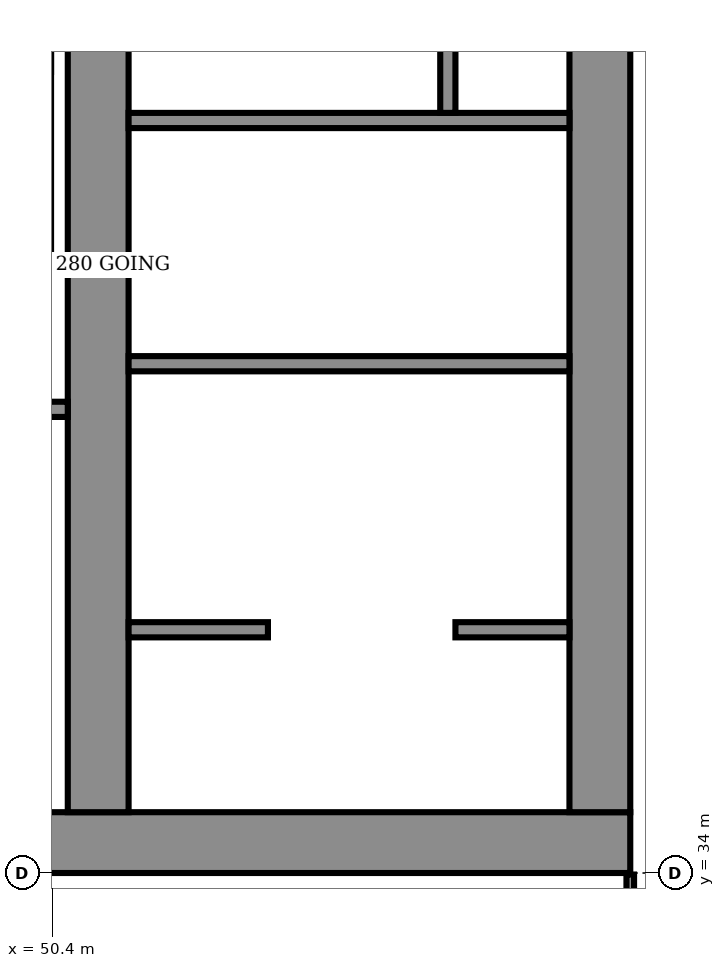
"""IFC4 building model, lengths in metres.
Left out: names, types, materials, properties, quantities, classifications, styles, units other than length and angle.
Written with IfcOpenShell. Run it as: python <this file> out.ifc"""

import sys

from ifc_helpers import new_model, si_unit, direction, frame, frame_2d, origin, place, context, subcontext, project, spatial, polyline, rectangle, outline, extrude, element, fill, save


model = new_model("IFC4")
c1 = context("Model", 3, precision=1e-05, world=origin(), true_north=direction((0.0, 1.0)))
c2 = subcontext(c1, "Body", "Model", "MODEL_VIEW")
j1 = project(units=[si_unit("LENGTHUNIT", "METRE"), si_unit("PLANEANGLEUNIT", "RADIAN")], contexts=[c1])
p1 = place(None, origin())
s1 = spatial("IfcSite", under=j1, at=p1, CompositionType="ELEMENT")
p2 = place(p1, origin())
s2 = spatial("IfcBuilding", under=s1, at=p2, CompositionType="ELEMENT")
p3 = place(p2, frame((0.0, 0.0, 151.9)))
s3 = spatial("IfcBuildingStorey", under=s2, at=p3, CompositionType="ELEMENT", Elevation=151.9)
p4 = place(p3, frame((16.0, 34.4, 0.0), z_axis=(0.0, 0.0, 1.0), x_axis=(1.0, 0.0, 0.0)))
e1 = element("IfcWall", 1, at=p4, inside=s3, PredefinedType="SHEAR", context=c2, shape_type="SweptSolid", body=[
    extrude(rectangle(XDim=42.0, YDim=0.8, at=frame_2d((21.0, 0.0))), origin(), (0.0, 0.0, 1.0), 3.6),
])
p5 = place(p4, frame((3.2, 0.0, 0.0)))
e2 = element("IfcOpeningElement", 2, at=p5, cuts=e1, PredefinedType="OPENING", context=c2, shape_type="SweptSolid", body=[
    extrude(rectangle(XDim=1.0, YDim=2.1, at=frame_2d((0.5, 1.05))), frame((0.0, 0.41, 0.0), z_axis=(0.0, -1.0, 0.0), x_axis=(1.0, 0.0, 0.0)), (0.0, 0.0, 1.0), 0.82),
])
p6 = place(p4, frame((7.65, 0.0, 0.0)))
e3 = element("IfcOpeningElement", 3, at=p6, cuts=e1, PredefinedType="OPENING", context=c2, shape_type="SweptSolid", body=[
    extrude(rectangle(XDim=1.2, YDim=2.1, at=frame_2d((0.6, 1.05))), frame((0.0, 0.41, 0.0), z_axis=(0.0, -1.0, 0.0), x_axis=(1.0, 0.0, 0.0)), (0.0, 0.0, 1.0), 0.82),
])
p7 = place(p4, frame((14.767, 0.0, 0.0)))
e4 = element("IfcOpeningElement", 4, at=p7, cuts=e1, PredefinedType="OPENING", context=c2, shape_type="SweptSolid", body=[
    extrude(rectangle(XDim=1.1, YDim=2.1, at=frame_2d((0.55, 1.05))), frame((0.0, 0.41, 0.0), z_axis=(0.0, -1.0, 0.0), x_axis=(1.0, 0.0, 0.0)), (0.0, 0.0, 1.0), 0.82),
])
p8 = place(p4, frame((19.133, 0.0, 0.0)))
e5 = element("IfcOpeningElement", 5, at=p8, cuts=e1, PredefinedType="OPENING", context=c2, shape_type="SweptSolid", body=[
    extrude(rectangle(XDim=1.1, YDim=2.1, at=frame_2d((0.55, 1.05))), frame((0.0, 0.41, 0.0), z_axis=(0.0, -1.0, 0.0), x_axis=(1.0, 0.0, 0.0)), (0.0, 0.0, 1.0), 0.82),
])
p9 = place(p4, frame((16.8, 0.0, 0.0)))
e6 = element("IfcOpeningElement", 6, at=p9, cuts=e1, PredefinedType="OPENING", context=c2, shape_type="SweptSolid", body=[
    extrude(rectangle(XDim=1.4, YDim=2.1, at=frame_2d((0.7, 1.05))), frame((0.0, 0.41, 0.0), z_axis=(0.0, -1.0, 0.0), x_axis=(1.0, 0.0, 0.0)), (0.0, 0.0, 1.0), 0.82),
])
p10 = place(p4, frame((21.767, 0.0, 0.0)))
e7 = element("IfcOpeningElement", 7, at=p10, cuts=e1, PredefinedType="OPENING", context=c2, shape_type="SweptSolid", body=[
    extrude(rectangle(XDim=1.1, YDim=2.1, at=frame_2d((0.55, 1.05))), frame((0.0, 0.41, 0.0), z_axis=(0.0, -1.0, 0.0), x_axis=(1.0, 0.0, 0.0)), (0.0, 0.0, 1.0), 0.82),
])
p11 = place(p4, frame((23.95, 0.0, 0.0)))
e8 = element("IfcOpeningElement", 8, at=p11, cuts=e1, PredefinedType="OPENING", context=c2, shape_type="SweptSolid", body=[
    extrude(rectangle(XDim=1.1, YDim=2.1, at=frame_2d((0.55, 1.05))), frame((0.0, 0.41, 0.0), z_axis=(0.0, -1.0, 0.0), x_axis=(1.0, 0.0, 0.0)), (0.0, 0.0, 1.0), 0.82),
])
p12 = place(p4, frame((26.133, 0.0, 0.0)))
e9 = element("IfcOpeningElement", 9, at=p12, cuts=e1, PredefinedType="OPENING", context=c2, shape_type="SweptSolid", body=[
    extrude(rectangle(XDim=1.1, YDim=2.1, at=frame_2d((0.55, 1.05))), frame((0.0, 0.41, 0.0), z_axis=(0.0, -1.0, 0.0), x_axis=(1.0, 0.0, 0.0)), (0.0, 0.0, 1.0), 0.82),
])
p13 = place(p4, frame((33.15, 0.0, 0.0)))
e10 = element("IfcOpeningElement", 10, at=p13, cuts=e1, PredefinedType="OPENING", context=c2, shape_type="SweptSolid", body=[
    extrude(rectangle(XDim=1.2, YDim=2.1, at=frame_2d((0.6, 1.05))), frame((0.0, 0.41, 0.0), z_axis=(0.0, -1.0, 0.0), x_axis=(1.0, 0.0, 0.0)), (0.0, 0.0, 1.0), 0.82),
])
p14 = place(p4, frame((35.817, 0.0, 0.0)))
e11 = element("IfcOpeningElement", 11, at=p14, cuts=e1, PredefinedType="OPENING", context=c2, shape_type="SweptSolid", body=[
    extrude(rectangle(XDim=1.0, YDim=2.1, at=frame_2d((0.5, 1.05))), frame((0.0, 0.41, 0.0), z_axis=(0.0, -1.0, 0.0), x_axis=(1.0, 0.0, 0.0)), (0.0, 0.0, 1.0), 0.82),
])
p15 = place(p4, frame((39.95, 0.0, 0.0)))
e12 = element("IfcOpeningElement", 12, at=p15, cuts=e1, PredefinedType="OPENING", context=c2, shape_type="SweptSolid", body=[
    extrude(rectangle(XDim=1.0, YDim=2.1, at=frame_2d((0.5, 1.05))), frame((0.0, 0.41, 0.0), z_axis=(0.0, -1.0, 0.0), x_axis=(1.0, 0.0, 0.0)), (0.0, 0.0, 1.0), 0.82),
])
p16 = place(p4, frame((37.767, 0.0, 0.0)))
e13 = element("IfcOpeningElement", 13, at=p16, cuts=e1, PredefinedType="OPENING", context=c2, shape_type="SweptSolid", body=[
    extrude(rectangle(XDim=1.4, YDim=2.1, at=frame_2d((0.7, 1.05))), frame((0.0, 0.41, 0.0), z_axis=(0.0, -1.0, 0.0), x_axis=(1.0, 0.0, 0.0)), (0.0, 0.0, 1.0), 0.82),
])
p17 = place(p3, frame((51.0, 34.8, 0.0), z_axis=(0.0, 0.0, 1.0), x_axis=(0.0, 1.0, 0.0)))
e14 = element("IfcWall", 14, at=p17, inside=s3, PredefinedType="SHEAR", context=c2, shape_type="SweptSolid", body=[
    extrude(rectangle(XDim=13.762, YDim=0.8, at=frame_2d((6.881, 0.0))), origin(), (0.0, 0.0, 1.0), 3.6),
])
p18 = place(p17, frame((3.6, 0.0, 0.0)))
e15 = element("IfcOpeningElement", 15, at=p18, cuts=e14, PredefinedType="OPENING", context=c2, shape_type="SweptSolid", body=[
    extrude(rectangle(XDim=1.1, YDim=2.1, at=frame_2d((0.55, 1.05))), frame((0.0, 0.41, 0.0), z_axis=(0.0, -1.0, 0.0), x_axis=(1.0, 0.0, 0.0)), (0.0, 0.0, 1.0), 0.82),
])
p19 = place(p3, frame((57.6, 34.8, 0.0), z_axis=(0.0, 0.0, 1.0), x_axis=(0.0, 1.0, 0.0)))
e16 = element("IfcWall", 16, at=p19, inside=s3, PredefinedType="SHEAR", context=c2, shape_type="SweptSolid", body=[
    extrude(rectangle(XDim=13.184, YDim=0.8, at=frame_2d((6.592, 0.0))), origin(), (0.0, 0.0, 1.0), 3.6),
])
p20 = place(p3, frame((44.4, 40.1, 0.0), z_axis=(0.0, 0.0, 1.0), x_axis=(1.0, 0.0, 0.0)))
e17 = element("IfcWall", 17, at=p20, inside=s3, PredefinedType="SHEAR", context=c2, shape_type="SweptSolid", body=[
    extrude(rectangle(XDim=6.2, YDim=0.2, at=frame_2d((3.1, 0.0))), origin(), (0.0, 0.0, 1.0), 3.2),
])
p21 = place(p20, frame((3.525, 0.0, 0.0)))
e18 = element("IfcOpeningElement", 18, at=p21, cuts=e17, PredefinedType="OPENING", context=c2, shape_type="SweptSolid", body=[
    extrude(rectangle(XDim=1.2, YDim=2.1, at=frame_2d((0.6, 1.05))), frame((0.0, 0.11, 0.0), z_axis=(0.0, -1.0, 0.0), x_axis=(1.0, 0.0, 0.0)), (0.0, 0.0, 1.0), 0.22),
])
p22 = place(p20, frame((0.575, 0.0, 0.0)))
e19 = element("IfcOpeningElement", 19, at=p22, cuts=e17, PredefinedType="OPENING", context=c2, shape_type="SweptSolid", body=[
    extrude(rectangle(XDim=0.9, YDim=2.1, at=frame_2d((0.45, 1.05))), frame((0.0, 0.11, 0.0), z_axis=(0.0, -1.0, 0.0), x_axis=(1.0, 0.0, 0.0)), (0.0, 0.0, 1.0), 0.22),
])
p23 = place(p3, frame((51.4, 37.2, 0.0), z_axis=(0.0, 0.0, 1.0), x_axis=(1.0, 0.0, 0.0)))
e20 = element("IfcWall", 20, at=p23, inside=s3, PredefinedType="PARTITIONING", context=c2, shape_type="SweptSolid", body=[
    extrude(rectangle(XDim=1.833, YDim=0.2, at=frame_2d((0.917, 0.0))), origin(), (0.0, 0.0, 1.0), 3.2),
])
p24 = place(p23, frame((0.417, 0.0, 0.0)))
e21 = element("IfcOpeningElement", 21, at=p24, cuts=e20, PredefinedType="OPENING", context=c2, shape_type="SweptSolid", body=[
    extrude(rectangle(XDim=1.0, YDim=2.1, at=frame_2d((0.5, 1.05))), frame((0.0, 0.11, 0.0), z_axis=(0.0, -1.0, 0.0), x_axis=(1.0, 0.0, 0.0)), (0.0, 0.0, 1.0), 0.22),
])
p25 = place(p3, frame((55.7, 37.2, 0.0), z_axis=(0.0, 0.0, 1.0), x_axis=(1.0, 0.0, 0.0)))
e22 = element("IfcWall", 22, at=p25, inside=s3, PredefinedType="PARTITIONING", context=c2, shape_type="SweptSolid", body=[
    extrude(rectangle(XDim=1.5, YDim=0.2, at=frame_2d((0.75, 0.0))), origin(), (0.0, 0.0, 1.0), 3.2),
])
p26 = place(p25, frame((0.25, 0.0, 0.0)))
e23 = element("IfcOpeningElement", 23, at=p26, cuts=e22, PredefinedType="OPENING", context=c2, shape_type="SweptSolid", body=[
    extrude(rectangle(XDim=1.0, YDim=2.1, at=frame_2d((0.5, 1.05))), frame((0.0, 0.11, 0.0), z_axis=(0.0, -1.0, 0.0), x_axis=(1.0, 0.0, 0.0)), (0.0, 0.0, 1.0), 0.22),
])
p27 = place(p3, frame((51.4, 40.7, 0.0), z_axis=(0.0, 0.0, 1.0), x_axis=(1.0, 0.0, 0.0)))
e24 = element("IfcWall", 24, at=p27, inside=s3, PredefinedType="PARTITIONING", context=c2, shape_type="SweptSolid", body=[
    extrude(rectangle(XDim=5.8, YDim=0.2, at=frame_2d((2.9, 0.0))), origin(), (0.0, 0.0, 1.0), 3.2),
])
p28 = place(p27, frame((0.367, 0.0, 0.0)))
e25 = element("IfcOpeningElement", 25, at=p28, cuts=e24, PredefinedType="OPENING", context=c2, shape_type="SweptSolid", body=[
    extrude(rectangle(XDim=1.1, YDim=2.1, at=frame_2d((0.55, 1.05))), frame((0.0, 0.11, 0.0), z_axis=(0.0, -1.0, 0.0), x_axis=(1.0, 0.0, 0.0)), (0.0, 0.0, 1.0), 0.22),
])
p29 = place(p27, frame((3.417, 0.0, 0.0)))
e26 = element("IfcOpeningElement", 26, at=p29, cuts=e24, PredefinedType="OPENING", context=c2, shape_type="SweptSolid", body=[
    extrude(rectangle(XDim=1.0, YDim=2.1, at=frame_2d((0.5, 1.05))), frame((0.0, 0.11, 0.0), z_axis=(0.0, -1.0, 0.0), x_axis=(1.0, 0.0, 0.0)), (0.0, 0.0, 1.0), 0.22),
])
p30 = place(p3, frame((51.4, 43.9, 0.0), z_axis=(0.0, 0.0, 1.0), x_axis=(1.0, 0.0, 0.0)))
e27 = element("IfcWall", 27, at=p30, inside=s3, PredefinedType="PARTITIONING", context=c2, shape_type="SweptSolid", body=[
    extrude(rectangle(XDim=5.8, YDim=0.2, at=frame_2d((2.9, 0.0))), origin(), (0.0, 0.0, 1.0), 3.2),
])
p31 = place(p30, frame((2.617, 0.0, 0.0)))
e28 = element("IfcOpeningElement", 28, at=p31, cuts=e27, PredefinedType="OPENING", context=c2, shape_type="SweptSolid", body=[
    extrude(rectangle(XDim=1.0, YDim=2.1, at=frame_2d((0.5, 1.05))), frame((0.0, 0.11, 0.0), z_axis=(0.0, -1.0, 0.0), x_axis=(1.0, 0.0, 0.0)), (0.0, 0.0, 1.0), 0.22),
])
p32 = place(p30, frame((4.5, 0.0, 0.0)))
e29 = element("IfcOpeningElement", 29, at=p32, cuts=e27, PredefinedType="OPENING", context=c2, shape_type="SweptSolid", body=[
    extrude(rectangle(XDim=1.0, YDim=2.1, at=frame_2d((0.5, 1.05))), frame((0.0, 0.11, 0.0), z_axis=(0.0, -1.0, 0.0), x_axis=(1.0, 0.0, 0.0)), (0.0, 0.0, 1.0), 0.22),
])
p33 = place(p3, origin())
e30 = element("IfcWall", 30, at=p33, inside=s3, PredefinedType="PARTITIONING", context=c2, shape_type="SweptSolid", body=[
    extrude(outline(polyline([(53.233, 34.8), (53.233, 37.3), (53.433, 37.3), (53.433, 34.8), (53.233, 34.8)])), origin(), (0.0, 0.0, 1.0), 3.2),
])
p34 = place(p3, origin())
e31 = element("IfcWall", 31, at=p34, inside=s3, PredefinedType="PARTITIONING", context=c2, shape_type="SweptSolid", body=[
    extrude(outline(polyline([(55.5, 34.8), (55.5, 37.3), (55.7, 37.3), (55.7, 34.8), (55.5, 34.8)])), origin(), (0.0, 0.0, 1.0), 3.2),
])
p35 = place(p3, origin())
e32 = element("IfcWall", 32, at=p35, inside=s3, PredefinedType="PARTITIONING", context=c2, shape_type="SweptSolid", body=[
    extrude(outline(polyline([(53.433, 40.8), (53.433, 43.8), (53.233, 43.8), (53.233, 40.8), (53.433, 40.8)])), origin(), (0.0, 0.0, 1.0), 3.2),
])
p36 = place(p3, frame((55.6, 44.0, 0.0), z_axis=(0.0, 0.0, 1.0), x_axis=(0.0, 1.0, 0.0)))
e33 = element("IfcWall", 33, at=p36, inside=s3, PredefinedType="PARTITIONING", context=c2, shape_type="SweptSolid", body=[
    extrude(rectangle(XDim=4.034, YDim=0.2, at=frame_2d((2.017, 0.0))), origin(), (0.0, 0.0, 1.0), 3.2),
])
p37 = place(p3, frame((58.0, 31.4, 0.0), z_axis=(0.0, 0.0, 1.0), x_axis=(0.0, 1.0, 0.0)))
e34 = element("IfcWall", 34, at=p37, inside=s3, PredefinedType="PARTITIONING", context=c2, shape_type="SweptSolid", body=[
    extrude(rectangle(XDim=2.58, YDim=0.1, at=frame_2d((1.29, 0.0))), origin(), (0.0, 0.0, 1.0), 3.2),
])
p38 = place(p37, frame((0.9, 0.0, 0.0)))
e35 = element("IfcOpeningElement", 35, at=p38, cuts=e34, PredefinedType="OPENING", context=c2, shape_type="SweptSolid", body=[
    extrude(rectangle(XDim=1.0, YDim=2.1, at=frame_2d((0.5, 1.05))), frame((0.0, 0.06, 0.0), z_axis=(0.0, -1.0, 0.0), x_axis=(1.0, 0.0, 0.0)), (0.0, 0.0, 1.0), 0.12),
])
p39 = place(p14, origin())
e36 = element("IfcDoor", 36, at=p39, inside=s3, OperationType="SINGLE_SWING_LEFT", PredefinedType="DOOR", context=c2, shape_type="SweptSolid", body=[
    extrude(rectangle(XDim=1.0, YDim=2.1, at=frame_2d((0.5, 1.05))), frame((0.0, 0.4, 0.0), z_axis=(0.0, -1.0, 0.0), x_axis=(1.0, 0.0, 0.0)), (0.0, 0.0, 1.0), 0.8),
])
fill(e11, e36)
p40 = place(p24, origin())
e37 = element("IfcDoor", 37, at=p40, inside=s3, OperationType="SINGLE_SWING_RIGHT", PredefinedType="DOOR", context=c2, shape_type="SweptSolid", body=[
    extrude(rectangle(XDim=1.0, YDim=2.1, at=frame_2d((0.5, 1.05))), frame((0.0, 0.025, 0.0), z_axis=(0.0, -1.0, 0.0), x_axis=(1.0, 0.0, 0.0)), (0.0, 0.0, 1.0), 0.05),
])
fill(e21, e37)
p41 = place(p15, origin())
e38 = element("IfcDoor", 38, at=p41, inside=s3, OperationType="SINGLE_SWING_LEFT", PredefinedType="DOOR", context=c2, shape_type="SweptSolid", body=[
    extrude(rectangle(XDim=1.0, YDim=2.1, at=frame_2d((0.5, 1.05))), frame((0.0, 0.4, 0.0), z_axis=(0.0, -1.0, 0.0), x_axis=(1.0, 0.0, 0.0)), (0.0, 0.0, 1.0), 0.8),
])
fill(e12, e38)
p42 = place(p26, origin())
e39 = element("IfcDoor", 39, at=p42, inside=s3, OperationType="SINGLE_SWING_RIGHT", PredefinedType="DOOR", context=c2, shape_type="SweptSolid", body=[
    extrude(rectangle(XDim=1.0, YDim=2.1, at=frame_2d((0.5, 1.05))), frame((0.0, 0.025, 0.0), z_axis=(0.0, -1.0, 0.0), x_axis=(1.0, 0.0, 0.0)), (0.0, 0.0, 1.0), 0.05),
])
fill(e23, e39)
p43 = place(p16, origin())
e40 = element("IfcDoor", 40, at=p43, inside=s3, OperationType="DOUBLE_DOOR_SINGLE_SWING", PredefinedType="DOOR", context=c2, shape_type="SweptSolid", body=[
    extrude(rectangle(XDim=1.4, YDim=2.1, at=frame_2d((0.7, 1.05))), frame((0.0, 0.025, 0.0), z_axis=(0.0, -1.0, 0.0), x_axis=(1.0, 0.0, 0.0)), (0.0, 0.0, 1.0), 0.05),
])
fill(e13, e40)
p44 = place(p28, origin())
e41 = element("IfcDoor", 41, at=p44, inside=s3, OperationType="DOUBLE_DOOR_SLIDING", PredefinedType="DOOR", context=c2, shape_type="SweptSolid", body=[
    extrude(rectangle(XDim=1.1, YDim=2.1, at=frame_2d((0.55, 1.05))), frame((0.0, 0.025, 0.0), z_axis=(0.0, -1.0, 0.0), x_axis=(1.0, 0.0, 0.0)), (0.0, 0.0, 1.0), 0.05),
])
fill(e25, e41)
p45 = place(p29, origin())
e42 = element("IfcDoor", 42, at=p45, inside=s3, OperationType="SINGLE_SWING_RIGHT", PredefinedType="DOOR", context=c2, shape_type="SweptSolid", body=[
    extrude(rectangle(XDim=1.0, YDim=2.1, at=frame_2d((0.5, 1.05))), frame((0.0, 0.025, 0.0), z_axis=(0.0, -1.0, 0.0), x_axis=(1.0, 0.0, 0.0)), (0.0, 0.0, 1.0), 0.05),
])
fill(e26, e42)
p46 = place(p31, origin())
e43 = element("IfcDoor", 43, at=p46, inside=s3, OperationType="SINGLE_SWING_LEFT", PredefinedType="DOOR", context=c2, shape_type="SweptSolid", body=[
    extrude(rectangle(XDim=1.0, YDim=2.1, at=frame_2d((0.5, 1.05))), frame((0.0, 0.025, 0.0), z_axis=(0.0, -1.0, 0.0), x_axis=(1.0, 0.0, 0.0)), (0.0, 0.0, 1.0), 0.05),
])
fill(e28, e43)
p47 = place(p32, origin())
e44 = element("IfcDoor", 44, at=p47, inside=s3, OperationType="SINGLE_SWING_LEFT", PredefinedType="DOOR", context=c2, shape_type="SweptSolid", body=[
    extrude(rectangle(XDim=1.0, YDim=2.1, at=frame_2d((0.5, 1.05))), frame((0.0, 0.025, 0.0), z_axis=(0.0, -1.0, 0.0), x_axis=(1.0, 0.0, 0.0)), (0.0, 0.0, 1.0), 0.05),
])
fill(e29, e44)
p48 = place(p18, origin())
e45 = element("IfcDoor", 45, at=p48, inside=s3, OperationType="SINGLE_SWING_RIGHT", PredefinedType="DOOR", context=c2, shape_type="SweptSolid", body=[
    extrude(rectangle(XDim=1.1, YDim=2.1, at=frame_2d((0.55, 1.05))), frame((0.0, 0.025, 0.0), z_axis=(0.0, -1.0, 0.0), x_axis=(1.0, 0.0, 0.0)), (0.0, 0.0, 1.0), 0.05),
])
fill(e15, e45)
save(model, sys.argv[1])
